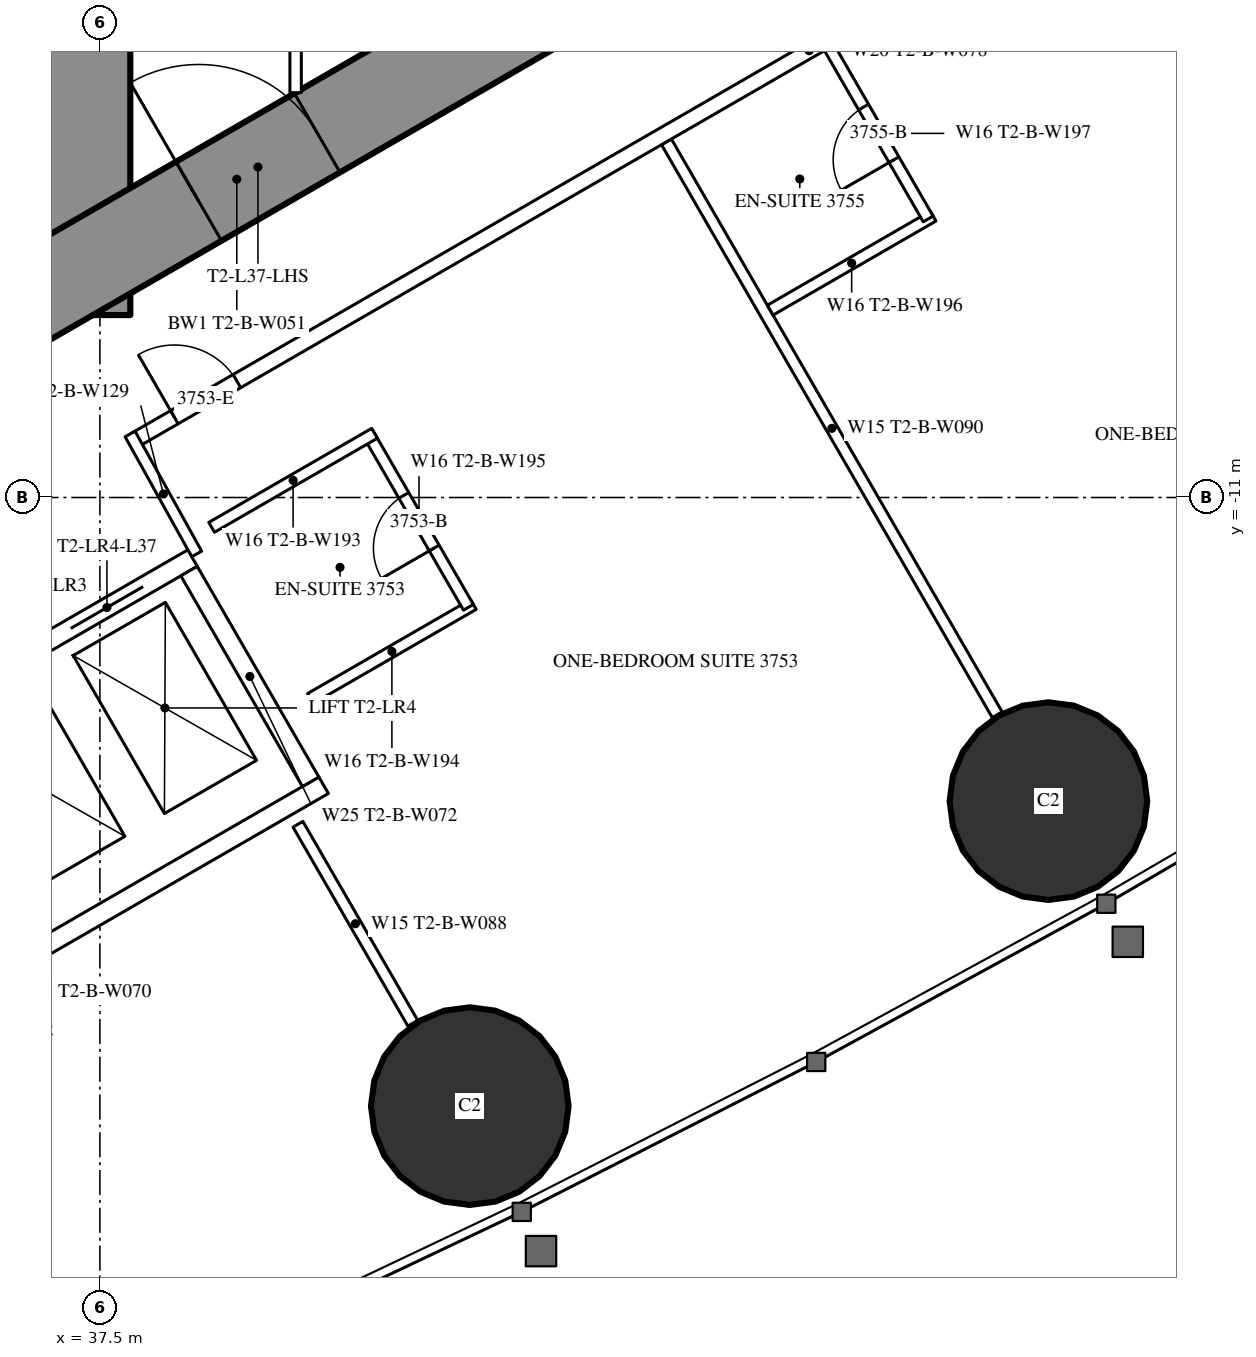
"""IFC4 building model, lengths in metres.
Left out: names, types, materials, properties, quantities, classifications, styles, units other than length and angle.
Written with IfcOpenShell. Run it as: python <this file> out.ifc"""

import sys

from ifc_helpers import new_model, si_unit, direction, frame, frame_2d, origin, origin_2d, place, context, subcontext, project, spatial, rectangle, hollow_circle, extrude, element, fill, save


model = new_model("IFC4")
c1 = context("Model", 3, precision=1e-05, world=origin(), true_north=direction((0.0, 1.0)))
c2 = subcontext(c1, "Body", "Model", "MODEL_VIEW")
j1 = project(units=[si_unit("LENGTHUNIT", "METRE"), si_unit("PLANEANGLEUNIT", "RADIAN")], contexts=[c1])
p1 = place(None, origin())
s1 = spatial("IfcSite", under=j1, at=p1, CompositionType="ELEMENT")
p2 = place(p1, origin())
s2 = spatial("IfcBuilding", under=s1, at=p2, CompositionType="ELEMENT")
p3 = place(p2, frame((0.0, 0.0, 139.6)))
s3 = spatial("IfcBuildingStorey", under=s2, at=p3, CompositionType="ELEMENT", Elevation=139.6)
for number, where, z_axis, x_axis in (
    (1, (42.366, -19.007, 0.0), (0.0, 0.0, 1.0), (1.0, 0.0, 0.0)),
    (2, (49.979, -14.994, 0.0), (0.0, 0.0, 1.0), (1.0, 0.0, 0.0)),
):
    element("IfcColumn", number, at=place(p3, frame(where, z_axis=z_axis, x_axis=x_axis)), inside=s3, PredefinedType="COLUMN", context=c2, shape_type="SweptSolid", body=[
        extrude(hollow_circle(Radius=1.3, WallThickness=0.1, at=origin_2d()), origin(), (0.0, 0.0, 1.0), 3.5),
    ])
p4 = place(p3, frame((37.3, -8.6, 0.0), z_axis=(0.0, 0.0, 1.0), x_axis=(0.0, 1.0, 0.0)))
e3 = element("IfcWall", 3, at=p4, inside=s3, PredefinedType="SHEAR", context=c2, shape_type="SweptSolid", body=[
    extrude(rectangle(XDim=17.2, YDim=1.2, at=frame_2d((8.6, 0.0))), origin(), (0.0, 0.0, 1.0), 3.5),
])
p5 = place(p4, frame((7.7, 0.0, 0.0)))
e4 = element("IfcOpeningElement", 4, at=p5, cuts=e3, PredefinedType="OPENING", context=c2, shape_type="SweptSolid", body=[
    extrude(rectangle(XDim=1.8, YDim=2.2, at=frame_2d((0.9, 1.1))), frame((0.0, 0.61, 0.0), z_axis=(0.0, -1.0, 0.0), x_axis=(1.0, 0.0, 0.0)), (0.0, 0.0, 1.0), 1.22),
])
p6 = place(p3, frame((27.2, -13.8, 0.0), z_axis=(0.0, 0.0, 1.0), x_axis=(0.866027159892, 0.499996958321, 0.0)))
e5 = element("IfcWall", 5, at=p6, inside=s3, PredefinedType="SHEAR", context=c2, shape_type="SweptSolid", body=[
    extrude(rectangle(XDim=27.947, YDim=1.2, at=frame_2d((13.973, 0.0))), origin(), (0.0, 0.0, 1.0), 3.5),
])
p7 = place(p6, frame((4.6, 0.0, 0.0)))
e6 = element("IfcOpeningElement", 6, at=p7, cuts=e5, PredefinedType="OPENING", context=c2, shape_type="SweptSolid", body=[
    extrude(rectangle(XDim=1.0, YDim=2.2, at=frame_2d((0.5, 1.1))), frame((0.0, 0.61, 0.0), z_axis=(0.0, -1.0, 0.0), x_axis=(1.0, 0.0, 0.0)), (0.0, 0.0, 1.0), 1.22),
])
p8 = place(p6, frame((13.395, 0.0, 0.0)))
e7 = element("IfcOpeningElement", 7, at=p8, cuts=e5, PredefinedType="OPENING", context=c2, shape_type="SweptSolid", body=[
    extrude(rectangle(XDim=1.8, YDim=2.2, at=frame_2d((0.9, 1.1))), frame((0.0, 0.61, 0.0), z_axis=(0.0, -1.0, 0.0), x_axis=(1.0, 0.0, 0.0)), (0.0, 0.0, 1.0), 1.22),
])
p9 = place(p3, frame((44.954, -6.321, 0.0), z_axis=(0.0, 0.0, 1.0), x_axis=(0.500018676722, -0.866014620505, 0.0)))
e8 = element("IfcWall", 8, at=p9, inside=s3, PredefinedType="PARTITIONING", context=c2, shape_type="SweptSolid", body=[
    extrude(rectangle(XDim=8.704, YDim=0.15, at=frame_2d((4.352, 0.0))), origin(), (0.0, 0.0, 1.0), 2.2),
])
p10 = place(p3, frame((40.105, -15.299, 0.0), z_axis=(0.0, 0.0, 1.0), x_axis=(0.499978822259, -0.866037630414, 0.0)))
e9 = element("IfcWall", 9, at=p10, inside=s3, PredefinedType="PARTITIONING", context=c2, shape_type="SweptSolid", body=[
    extrude(rectangle(XDim=3.023, YDim=0.15, at=frame_2d((1.511, 0.0))), origin(), (0.0, 0.0, 1.0), 3.25),
])
p11 = place(p3, frame((37.96, -10.243, 0.0), z_axis=(0.0, 0.0, 1.0), x_axis=(0.866026429433, 0.499998223521, 0.0)))
e10 = element("IfcWall", 10, at=p11, inside=s3, PredefinedType="PARTITIONING", context=c2, shape_type="SweptSolid", body=[
    extrude(rectangle(XDim=20.487, YDim=0.2, at=frame_2d((10.243, 0.0))), origin(), (0.0, 0.0, 1.0), 3.25),
])
p12 = place(p11, frame((10.743, 0.0, 0.0)))
e11 = element("IfcOpeningElement", 11, at=p12, cuts=e10, PredefinedType="OPENING", context=c2, shape_type="SweptSolid", body=[
    extrude(rectangle(XDim=0.95, YDim=2.2, at=frame_2d((0.475, 1.1))), frame((0.0, 0.11, 0.0), z_axis=(0.0, -1.0, 0.0), x_axis=(1.0, 0.0, 0.0)), (0.0, 0.0, 1.0), 0.22),
])
p13 = place(p11, frame((17.586, 0.0, 0.0)))
e12 = element("IfcOpeningElement", 12, at=p13, cuts=e10, PredefinedType="OPENING", context=c2, shape_type="SweptSolid", body=[
    extrude(rectangle(XDim=1.8, YDim=2.2, at=frame_2d((0.9, 1.1))), frame((0.0, 0.11, 0.0), z_axis=(0.0, -1.0, 0.0), x_axis=(1.0, 0.0, 0.0)), (0.0, 0.0, 1.0), 0.22),
])
p14 = place(p11, frame((0.6, 0.0, 0.0)))
e13 = element("IfcOpeningElement", 13, at=p14, cuts=e10, PredefinedType="OPENING", context=c2, shape_type="SweptSolid", body=[
    extrude(rectangle(XDim=0.95, YDim=2.2, at=frame_2d((0.475, 1.1))), frame((0.0, 0.11, 0.0), z_axis=(0.0, -1.0, 0.0), x_axis=(1.0, 0.0, 0.0)), (0.0, 0.0, 1.0), 0.22),
])
p15 = place(p3, frame((38.773, -11.742, 0.0), z_axis=(0.0, 0.0, 1.0), x_axis=(-0.485528096672, 0.8742210632, 0.0)))
e14 = element("IfcWall", 14, at=p15, inside=s3, PredefinedType="PARTITIONING", context=c2, shape_type="SweptSolid", body=[
    extrude(rectangle(XDim=1.805, YDim=0.15, at=frame_2d((0.903, 0.0))), origin(), (0.0, 0.0, 1.0), 3.25),
])
p16 = place(p3, frame((46.319, -8.535, 0.0), z_axis=(0.0, 0.0, 1.0), x_axis=(0.866006523861, 0.500032699561, 0.0)))
e15 = element("IfcWall", 15, at=p16, inside=s3, PredefinedType="PARTITIONING", context=c2, shape_type="SweptSolid", body=[
    extrude(rectangle(XDim=2.475, YDim=0.15, at=frame_2d((1.237, 0.0))), origin(), (0.0, 0.0, 1.0), 3.25),
])
p17 = place(p3, frame((47.097, -5.084, 0.0), z_axis=(0.0, 0.0, 1.0), x_axis=(0.500006934395, -0.866021400173, 0.0)))
e16 = element("IfcWall", 16, at=p17, inside=s3, PredefinedType="PARTITIONING", context=c2, shape_type="SweptSolid", body=[
    extrude(rectangle(XDim=2.6, YDim=0.15, at=frame_2d((1.3, 0.0))), origin(), (0.0, 0.0, 1.0), 3.25),
])
p18 = place(p17, frame((0.9, 0.0, 0.0)))
e17 = element("IfcOpeningElement", 17, at=p18, cuts=e16, PredefinedType="OPENING", context=c2, shape_type="SweptSolid", body=[
    extrude(rectangle(XDim=0.8, YDim=2.2, at=frame_2d((0.4, 1.1))), frame((0.0, 0.085, 0.0), z_axis=(0.0, -1.0, 0.0), x_axis=(1.0, 0.0, 0.0)), (0.0, 0.0, 1.0), 0.17),
])
p19 = place(p3, frame((40.27, -13.644, 0.0), z_axis=(0.0, 0.0, 1.0), x_axis=(0.866031185235, 0.4999899861, 0.0)))
e18 = element("IfcWall", 18, at=p19, inside=s3, PredefinedType="PARTITIONING", context=c2, shape_type="SweptSolid", body=[
    extrude(rectangle(XDim=2.475, YDim=0.15, at=frame_2d((1.238, 0.0))), origin(), (0.0, 0.0, 1.0), 3.25),
])
p20 = place(p3, frame((41.048, -10.193, 0.0), z_axis=(0.0, 0.0, 1.0), x_axis=(0.500047596559, -0.865997922154, 0.0)))
e19 = element("IfcWall", 19, at=p20, inside=s3, PredefinedType="PARTITIONING", context=c2, shape_type="SweptSolid", body=[
    extrude(rectangle(XDim=2.6, YDim=0.15, at=frame_2d((1.3, 0.0))), origin(), (0.0, 0.0, 1.0), 3.25),
])
p21 = place(p20, frame((0.9, 0.0, 0.0)))
e20 = element("IfcOpeningElement", 20, at=p21, cuts=e19, PredefinedType="OPENING", context=c2, shape_type="SweptSolid", body=[
    extrude(rectangle(XDim=0.8, YDim=2.2, at=frame_2d((0.4, 1.1))), frame((0.0, 0.085, 0.0), z_axis=(0.0, -1.0, 0.0), x_axis=(1.0, 0.0, 0.0)), (0.0, 0.0, 1.0), 0.17),
])
p22 = place(p3, frame((38.97, -11.393, 0.0), z_axis=(0.0, 0.0, 1.0), x_axis=(0.866031185235, 0.4999899861, 0.0)))
e21 = element("IfcWall", 21, at=p22, inside=s3, PredefinedType="PARTITIONING", context=c2, shape_type="SweptSolid", body=[
    extrude(rectangle(XDim=2.475, YDim=0.15, at=frame_2d((1.238, 0.0))), origin(), (0.0, 0.0, 1.0), 3.25),
])
p23 = place(p3, frame((40.075, -5.674, 0.0), z_axis=(0.0, 0.0, 1.0), x_axis=(0.0, 1.0, 0.0)))
e22 = element("IfcWall", 22, at=p23, inside=s3, PredefinedType="PARTITIONING", context=c2, shape_type="SweptSolid", body=[
    extrude(rectangle(XDim=6.874, YDim=0.15, at=frame_2d((3.437, 0.0))), origin(), (0.0, 0.0, 1.0), 3.25),
])
p24 = place(p23, frame((2.537, 0.0, 0.0)))
e23 = element("IfcOpeningElement", 23, at=p24, cuts=e22, PredefinedType="OPENING", context=c2, shape_type="SweptSolid", body=[
    extrude(rectangle(XDim=1.8, YDim=2.2, at=frame_2d((0.9, 1.1))), frame((0.0, 0.085, 0.0), z_axis=(0.0, -1.0, 0.0), x_axis=(1.0, 0.0, 0.0)), (0.0, 0.0, 1.0), 0.17),
])
p25 = place(p3, frame((31.271, -16.097, 0.0), z_axis=(0.0, 0.0, 1.0), x_axis=(0.86604045752, 0.499973925258, 0.0)))
e24 = element("IfcWall", 24, at=p25, inside=s3, PredefinedType="PARTITIONING", context=c2, shape_type="SweptSolid", body=[
    extrude(rectangle(XDim=8.6, YDim=0.25, at=frame_2d((4.3, 0.0))), origin(), (0.0, 0.0, 1.0), 3.25),
])
p26 = place(p25, frame((0.75, 0.0, 0.0)))
e25 = element("IfcOpeningElement", 25, at=p26, cuts=e24, PredefinedType="OPENING", context=c2, shape_type="SweptSolid", body=[
    extrude(rectangle(XDim=1.1, YDim=2.2, at=frame_2d((0.55, 1.1))), frame((0.0, 0.135, 0.0), z_axis=(0.0, -1.0, 0.0), x_axis=(1.0, 0.0, 0.0)), (0.0, 0.0, 1.0), 0.27),
])
p27 = place(p25, frame((2.75, 0.0, 0.0)))
e26 = element("IfcOpeningElement", 26, at=p27, cuts=e24, PredefinedType="OPENING", context=c2, shape_type="SweptSolid", body=[
    extrude(rectangle(XDim=1.1, YDim=2.2, at=frame_2d((0.55, 1.1))), frame((0.0, 0.135, 0.0), z_axis=(0.0, -1.0, 0.0), x_axis=(1.0, 0.0, 0.0)), (0.0, 0.0, 1.0), 0.27),
])
p28 = place(p25, frame((4.75, 0.0, 0.0)))
e27 = element("IfcOpeningElement", 27, at=p28, cuts=e24, PredefinedType="OPENING", context=c2, shape_type="SweptSolid", body=[
    extrude(rectangle(XDim=1.1, YDim=2.2, at=frame_2d((0.55, 1.1))), frame((0.0, 0.135, 0.0), z_axis=(0.0, -1.0, 0.0), x_axis=(1.0, 0.0, 0.0)), (0.0, 0.0, 1.0), 0.27),
])
p29 = place(p25, frame((6.75, 0.0, 0.0)))
e28 = element("IfcOpeningElement", 28, at=p29, cuts=e24, PredefinedType="OPENING", context=c2, shape_type="SweptSolid", body=[
    extrude(rectangle(XDim=1.1, YDim=2.2, at=frame_2d((0.55, 1.1))), frame((0.0, 0.135, 0.0), z_axis=(0.0, -1.0, 0.0), x_axis=(1.0, 0.0, 0.0)), (0.0, 0.0, 1.0), 0.27),
])
p30 = place(p3, frame((32.996, -19.086, 0.0), z_axis=(0.0, 0.0, 1.0), x_axis=(0.866028165386, 0.499995216735, 0.0)))
e29 = element("IfcWall", 29, at=p30, inside=s3, PredefinedType="PARTITIONING", context=c2, shape_type="SweptSolid", body=[
    extrude(rectangle(XDim=8.6, YDim=0.25, at=frame_2d((4.3, 0.0))), origin(), (0.0, 0.0, 1.0), 3.25),
])
p31 = place(p3, frame((38.673, -11.968, 0.0), z_axis=(0.0, 0.0, 1.0), x_axis=(0.499929347863, -0.866066190972, 0.0)))
e30 = element("IfcWall", 30, at=p31, inside=s3, PredefinedType="PARTITIONING", context=c2, shape_type="SweptSolid", body=[
    extrude(rectangle(XDim=3.201, YDim=0.25, at=frame_2d((1.6, 0.0))), origin(), (0.0, 0.0, 1.0), 3.25),
])
p32 = place(p18, origin())
e31 = element("IfcDoor", 31, at=p32, inside=s3, OperationType="SINGLE_SWING_RIGHT", PredefinedType="DOOR", context=c2, shape_type="SweptSolid", body=[
    extrude(rectangle(XDim=0.8, YDim=2.2, at=frame_2d((0.4, 1.1))), frame((0.0, 0.025, 0.0), z_axis=(0.0, -1.0, 0.0), x_axis=(1.0, 0.0, 0.0)), (0.0, 0.0, 1.0), 0.05),
])
fill(e17, e31)
p33 = place(p21, origin())
e32 = element("IfcDoor", 32, at=p33, inside=s3, OperationType="SINGLE_SWING_RIGHT", PredefinedType="DOOR", context=c2, shape_type="SweptSolid", body=[
    extrude(rectangle(XDim=0.8, YDim=2.2, at=frame_2d((0.4, 1.1))), frame((0.0, 0.025, 0.0), z_axis=(0.0, -1.0, 0.0), x_axis=(1.0, 0.0, 0.0)), (0.0, 0.0, 1.0), 0.05),
])
fill(e20, e32)
p34 = place(p14, origin())
e33 = element("IfcDoor", 33, at=p34, inside=s3, OperationType="SINGLE_SWING_LEFT", PredefinedType="DOOR", context=c2, shape_type="SweptSolid", body=[
    extrude(rectangle(XDim=0.95, YDim=2.2, at=frame_2d((0.475, 1.1))), frame((0.0, 0.025, 0.0), z_axis=(0.0, -1.0, 0.0), x_axis=(1.0, 0.0, 0.0)), (0.0, 0.0, 1.0), 0.05),
])
fill(e13, e33)
p35 = place(p8, origin())
e34 = element("IfcDoor", 34, at=p35, inside=s3, OperationType="DOUBLE_DOOR_SINGLE_SWING", PredefinedType="DOOR", context=c2, shape_type="SweptSolid", body=[
    extrude(rectangle(XDim=1.8, YDim=2.2, at=frame_2d((0.9, 1.1))), frame((0.0, 0.025, 0.0), z_axis=(0.0, -1.0, 0.0), x_axis=(1.0, 0.0, 0.0)), (0.0, 0.0, 1.0), 0.05),
])
fill(e7, e34)
p36 = place(p29, origin())
e35 = element("IfcDoor", 35, at=p36, inside=s3, OperationType="DOUBLE_DOOR_SLIDING", PredefinedType="USERDEFINED", context=c2, shape_type="SweptSolid", body=[
    extrude(rectangle(XDim=1.1, YDim=2.2, at=frame_2d((0.55, 1.1))), frame((0.0, 0.025, 0.0), z_axis=(0.0, -1.0, 0.0), x_axis=(1.0, 0.0, 0.0)), (0.0, 0.0, 1.0), 0.05),
])
fill(e28, e35)
save(model, sys.argv[1])
